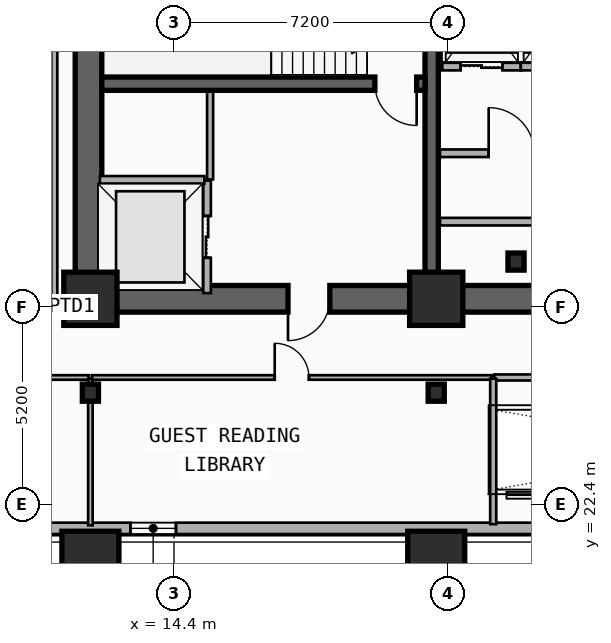
"""IFC4 building model, lengths in metres.
Left out: names, types, materials, properties, quantities, classifications, styles, units other than length and angle.
Written with IfcOpenShell. Run it as: python <this file> out.ifc"""

import sys

from ifc_helpers import new_model, si_unit, direction, frame, frame_2d, origin, origin_2d, place, context, subcontext, project, spatial, rectangle, i_section, extrude, element, fill, save


model = new_model("IFC4")
c1 = context("Model", 3, precision=1e-05, world=origin(), true_north=direction((0.0, 1.0)))
c2 = subcontext(c1, "Body", "Model", "MODEL_VIEW")
j1 = project(units=[si_unit("LENGTHUNIT", "METRE"), si_unit("PLANEANGLEUNIT", "RADIAN")], contexts=[c1])
p1 = place(None, origin())
s1 = spatial("IfcSite", under=j1, at=p1, CompositionType="ELEMENT")
p2 = place(p1, origin())
s2 = spatial("IfcBuilding", under=s1, at=p2, CompositionType="ELEMENT")
p3 = place(p2, frame((0.0, 0.0, 57.0)))
s3 = spatial("IfcBuildingStorey", under=s2, at=p3, CompositionType="ELEMENT", Elevation=57.0)
p4 = place(p3, frame((21.18, 27.82, 0.0), z_axis=(0.0, 0.0, 1.0), x_axis=(-1.0, 0.0, 0.0)))
e1 = element("IfcWall", 1, at=p4, inside=s3, PredefinedType="SHEAR", context=c2, shape_type="SweptSolid", body=[
    extrude(rectangle(XDim=9.03, YDim=0.7, at=frame_2d((4.515, 0.0))), origin(), (0.0, 0.0, 1.0), 3.5),
])
p5 = place(p4, frame((2.68, 0.0, 0.0)))
e2 = element("IfcOpeningElement", 2, at=p5, cuts=e1, PredefinedType="OPENING", context=c2, shape_type="SweptSolid", body=[
    extrude(rectangle(XDim=1.1, YDim=2.15, at=frame_2d((0.55, 1.075))), frame((0.0, 0.36, 0.0), z_axis=(0.0, -1.0, 0.0), x_axis=(1.0, 0.0, 0.0)), (0.0, 0.0, 1.0), 0.72),
])
p6 = place(p3, frame((33.15, 27.82, 0.0), z_axis=(0.0, 0.0, 1.0), x_axis=(-1.0, 0.0, 0.0)))
e3 = element("IfcWall", 3, at=p6, inside=s3, PredefinedType="SHEAR", context=c2, shape_type="SweptSolid", body=[
    extrude(rectangle(XDim=11.97, YDim=0.7, at=frame_2d((5.985, 0.0))), origin(), (0.0, 0.0, 1.0), 3.5),
])
p7 = place(p6, frame((6.1, 0.0, 0.0)))
e4 = element("IfcOpeningElement", 4, at=p7, cuts=e3, PredefinedType="OPENING", context=c2, shape_type="SweptSolid", body=[
    extrude(rectangle(XDim=1.6, YDim=2.2, at=frame_2d((0.8, 1.1))), frame((0.0, 0.36, 0.0), z_axis=(0.0, -1.0, 0.0), x_axis=(1.0, 0.0, 0.0)), (0.0, 0.0, 1.0), 0.72),
])
p8 = place(p3, frame((12.15, 28.17, 0.0), z_axis=(0.0, 0.0, 1.0), x_axis=(0.0, 1.0, 0.0)))
e5 = element("IfcWall", 5, at=p8, inside=s3, PredefinedType="SHEAR", context=c2, shape_type="SweptSolid", body=[
    extrude(rectangle(XDim=8.53, YDim=0.7, at=frame_2d((4.265, 0.0))), origin(), (0.0, 0.0, 1.0), 3.5),
])
p9 = place(p3, frame((21.18, 28.17, 0.0), z_axis=(0.0, 0.0, 1.0), x_axis=(0.0, 1.0, 0.0)))
e6 = element("IfcWall", 6, at=p9, inside=s3, PredefinedType="SHEAR", context=c2, shape_type="SweptSolid", body=[
    extrude(rectangle(XDim=8.53, YDim=0.35, at=frame_2d((4.265, 0.0))), origin(), (0.0, 0.0, 1.0), 3.5),
])
p10 = place(p3, frame((21.005, 33.48, 0.0), z_axis=(0.0, 0.0, 1.0), x_axis=(-1.0, 0.0, 0.0)))
e7 = element("IfcWall", 7, at=p10, inside=s3, PredefinedType="SHEAR", context=c2, shape_type="SweptSolid", body=[
    extrude(rectangle(XDim=8.505, YDim=0.35, at=frame_2d((4.252, 0.0))), origin(), (0.0, 0.0, 1.0), 3.5),
])
p11 = place(p10, frame((0.22, 0.0, 0.0)))
e8 = element("IfcOpeningElement", 8, at=p11, cuts=e7, PredefinedType="OPENING", context=c2, shape_type="SweptSolid", body=[
    extrude(rectangle(XDim=1.1, YDim=2.15, at=frame_2d((0.55, 1.075))), frame((0.0, 0.185, 0.0), z_axis=(0.0, -1.0, 0.0), x_axis=(1.0, 0.0, 0.0)), (0.0, 0.0, 1.0), 0.37),
])
p12 = place(p3, frame((23.4, 28.8, 0.0), z_axis=(0.0, 0.0, 1.0), x_axis=(1.0, 0.0, 0.0)))
e9 = element("IfcColumn", 9, at=p12, inside=s3, PredefinedType="COLUMN", context=c2, shape_type="SweptSolid", body=[
    extrude(i_section(OverallWidth=0.424, OverallDepth=0.45, WebThickness=0.041, FlangeThickness=0.065, FilletRadius=0.015, at=origin_2d()), origin(), (0.0, 0.0, 1.0), 3.5),
])
for number, where, z_axis, x_axis in (
    (10, (12.2, 27.82, 0.0), (0.0, 0.0, 1.0), (1.0, 0.0, 0.0)),
    (11, (21.3, 27.82, 0.0), (0.0, 0.0, 1.0), (1.0, 0.0, 0.0)),
):
    element("IfcColumn", number, at=place(p3, frame(where, z_axis=z_axis, x_axis=x_axis)), inside=s3, PredefinedType="COLUMN", context=c2, shape_type="SweptSolid", body=[
        extrude(rectangle(XDim=1.4, YDim=1.4, at=origin_2d()), origin(), (0.0, 0.0, 1.0), 3.5),
    ])
for number, where, z_axis, x_axis in (
    (12, (12.2, 25.35, 0.0), (0.0, 0.0, 1.0), (1.0, 0.0, 0.0)),
    (13, (21.3, 25.35, 0.0), (0.0, 0.0, 1.0), (1.0, 0.0, 0.0)),
):
    element("IfcColumn", number, at=place(p3, frame(where, z_axis=z_axis, x_axis=x_axis)), inside=s3, PredefinedType="COLUMN", context=c2, shape_type="SweptSolid", body=[
        extrude(i_section(OverallWidth=0.424, OverallDepth=0.45, WebThickness=0.041, FlangeThickness=0.065, FilletRadius=0.015, at=origin_2d()), origin(), (0.0, 0.0, 1.0), 3.5),
    ])
for number, where, z_axis, x_axis in (
    (14, (12.2, 21.062, 0.0), (0.0, -0.09, 0.996), (1.0, 0.0, 0.0)),
    (15, (21.3, 21.062, 0.0), (0.0, -0.09, 0.996), (1.0, 0.0, 0.0)),
):
    element("IfcColumn", number, at=place(p3, frame(where, z_axis=z_axis, x_axis=x_axis)), inside=s3, PredefinedType="COLUMN", context=c2, shape_type="SweptSolid", body=[
        extrude(rectangle(XDim=1.5, YDim=1.5, at=origin_2d()), origin(), (0.0, 0.0, 1.0), 3.514),
    ])
p13 = place(p3, frame((53.4, 21.78, 0.0), z_axis=(0.0, 0.0, 1.0), x_axis=(-1.0, 0.0, 0.0)))
e16 = element("IfcWall", 16, at=p13, inside=s3, PredefinedType="SOLIDWALL", context=c2, shape_type="SweptSolid", body=[
    extrude(rectangle(XDim=49.2, YDim=0.3, at=frame_2d((24.6, 0.0))), origin(), (0.0, 0.0, 1.0), 2.72),
])
p14 = place(p13, frame((43.109, 0.0, 0.74)))
e17 = element("IfcOpeningElement", 17, at=p14, cuts=e16, PredefinedType="OPENING", context=c2, shape_type="SweptSolid", body=[
    extrude(rectangle(XDim=1.8, YDim=1.8, at=frame_2d((0.9, 0.9))), frame((0.0, 0.16, 0.0), z_axis=(0.0, -1.0, 0.0), x_axis=(1.0, 0.0, 0.0)), (0.0, 0.0, 1.0), 0.32),
])
p15 = place(p13, frame((38.948, 0.0, 0.48)))
e18 = element("IfcOpeningElement", 18, at=p15, cuts=e16, PredefinedType="OPENING", context=c2, shape_type="SweptSolid", body=[
    extrude(rectangle(XDim=1.2, YDim=1.5, at=frame_2d((0.6, 0.75))), frame((0.0, 0.16, 0.0), z_axis=(0.0, -1.0, 0.0), x_axis=(1.0, 0.0, 0.0)), (0.0, 0.0, 1.0), 0.32),
])
p16 = place(p13, frame((14.798, 0.0, 0.48)))
e19 = element("IfcOpeningElement", 19, at=p16, cuts=e16, PredefinedType="OPENING", context=c2, shape_type="SweptSolid", body=[
    extrude(rectangle(XDim=1.2, YDim=1.5, at=frame_2d((0.6, 0.75))), frame((0.0, 0.16, 0.0), z_axis=(0.0, -1.0, 0.0), x_axis=(1.0, 0.0, 0.0)), (0.0, 0.0, 1.0), 0.32),
])
p17 = place(p13, frame((4.291, 0.0, 0.74)))
e20 = element("IfcOpeningElement", 20, at=p17, cuts=e16, PredefinedType="OPENING", context=c2, shape_type="SweptSolid", body=[
    extrude(rectangle(XDim=1.8, YDim=1.8, at=frame_2d((0.9, 0.9))), frame((0.0, 0.16, 0.0), z_axis=(0.0, -1.0, 0.0), x_axis=(1.0, 0.0, 0.0)), (0.0, 0.0, 1.0), 0.32),
])
p18 = place(p3, frame((15.27, 27.97, 0.0), z_axis=(0.0, 0.0, 1.0), x_axis=(0.0, 1.0, 0.0)))
e21 = element("IfcWall", 21, at=p18, inside=s3, PredefinedType="PARTITIONING", context=c2, shape_type="SweptSolid", body=[
    extrude(rectangle(XDim=2.96, YDim=0.2, at=frame_2d((1.48, 0.0))), origin(), (0.0, 0.0, 1.0), 2.212),
])
p19 = place(p18, frame((0.93, 0.0, 0.0)))
e22 = element("IfcOpeningElement", 22, at=p19, cuts=e21, PredefinedType="OPENING", context=c2, shape_type="SweptSolid", body=[
    extrude(rectangle(XDim=1.1, YDim=2.15, at=frame_2d((0.55, 1.075))), frame((0.0, 0.11, 0.0), z_axis=(0.0, -1.0, 0.0), x_axis=(1.0, 0.0, 0.0)), (0.0, 0.0, 1.0), 0.22),
])
p20 = place(p3, frame((12.45, 30.95, 0.0), z_axis=(0.0, 0.0, 1.0), x_axis=(1.0, 0.0, 0.0)))
e23 = element("IfcWall", 23, at=p20, inside=s3, PredefinedType="PARTITIONING", context=c2, shape_type="SweptSolid", body=[
    extrude(rectangle(XDim=2.75, YDim=0.2, at=frame_2d((1.375, 0.0))), origin(), (0.0, 0.0, 1.0), 2.212),
])
p21 = place(p3, frame((21.46, 33.93, 0.0), z_axis=(0.0, 0.0, 1.0), x_axis=(1.0, 0.0, 0.0)))
e24 = element("IfcWall", 24, at=p21, inside=s3, PredefinedType="PARTITIONING", context=c2, shape_type="SweptSolid", body=[
    extrude(rectangle(XDim=2.065, YDim=0.2, at=frame_2d((1.032, 0.0))), origin(), (0.0, 0.0, 1.0), 2.212),
])
p22 = place(p21, frame((0.482, 0.0, 0.0)))
e25 = element("IfcOpeningElement", 25, at=p22, cuts=e24, PredefinedType="OPENING", context=c2, shape_type="SweptSolid", body=[
    extrude(rectangle(XDim=1.1, YDim=2.15, at=frame_2d((0.55, 1.075))), frame((0.0, 0.11, 0.0), z_axis=(0.0, -1.0, 0.0), x_axis=(1.0, 0.0, 0.0)), (0.0, 0.0, 1.0), 0.22),
])
p23 = place(p3, frame((23.525, 33.93, 0.0), z_axis=(0.0, 0.0, 1.0), x_axis=(1.0, 0.0, 0.0)))
e26 = element("IfcWall", 26, at=p23, inside=s3, PredefinedType="PARTITIONING", context=c2, shape_type="SweptSolid", body=[
    extrude(rectangle(XDim=2.05, YDim=0.2, at=frame_2d((1.025, 0.0))), origin(), (0.0, 0.0, 1.0), 3.24),
])
p24 = place(p23, frame((0.475, 0.0, 0.0)))
e27 = element("IfcOpeningElement", 27, at=p24, cuts=e26, PredefinedType="OPENING", context=c2, shape_type="SweptSolid", body=[
    extrude(rectangle(XDim=1.1, YDim=2.15, at=frame_2d((0.55, 1.075))), frame((0.0, 0.11, 0.0), z_axis=(0.0, -1.0, 0.0), x_axis=(1.0, 0.0, 0.0)), (0.0, 0.0, 1.0), 0.22),
])
p25 = place(p3, frame((21.4, 31.65, 0.0), z_axis=(0.0, 0.0, 1.0), x_axis=(1.0, 0.0, 0.0)))
e28 = element("IfcWall", 28, at=p25, inside=s3, PredefinedType="PARTITIONING", context=c2, shape_type="SweptSolid", body=[
    extrude(rectangle(XDim=3.76, YDim=0.2, at=frame_2d((1.88, 0.0))), origin(), (0.0, 0.0, 1.0), 2.28),
])
p26 = place(p25, frame((1.28, 0.0, 0.0)))
e29 = element("IfcOpeningElement", 29, at=p26, cuts=e28, PredefinedType="OPENING", context=c2, shape_type="SweptSolid", body=[
    extrude(rectangle(XDim=1.2, YDim=2.15, at=frame_2d((0.6, 1.075))), frame((0.0, 0.11, 0.0), z_axis=(0.0, -1.0, 0.0), x_axis=(1.0, 0.0, 0.0)), (0.0, 0.0, 1.0), 0.22),
])
p27 = place(p3, frame((21.4, 29.85, 0.0), z_axis=(0.0, 0.0, 1.0), x_axis=(1.0, 0.0, 0.0)))
e30 = element("IfcWall", 30, at=p27, inside=s3, PredefinedType="PARTITIONING", context=c2, shape_type="SweptSolid", body=[
    extrude(rectangle(XDim=3.76, YDim=0.2, at=frame_2d((1.88, 0.0))), origin(), (0.0, 0.0, 1.0), 2.28),
])
p28 = place(p3, frame((0.26, 25.75, 0.0), z_axis=(0.0, 0.0, 1.0), x_axis=(1.0, 0.0, 0.0)))
e31 = element("IfcWall", 31, at=p28, inside=s3, PredefinedType="PARTITIONING", context=c2, shape_type="SweptSolid", body=[
    extrude(rectangle(XDim=11.9, YDim=0.12, at=frame_2d((5.95, 0.0))), origin(), (0.0, 0.0, 1.0), 2.31),
])
p29 = place(p28, frame((5.5, 0.0, 0.0)))
e32 = element("IfcOpeningElement", 32, at=p29, cuts=e31, PredefinedType="OPENING", context=c2, shape_type="SweptSolid", body=[
    extrude(rectangle(XDim=0.9, YDim=2.1, at=frame_2d((0.45, 1.05))), frame((0.0, 0.07, 0.0), z_axis=(0.0, -1.0, 0.0), x_axis=(1.0, 0.0, 0.0)), (0.0, 0.0, 1.0), 0.14),
])
p30 = place(p3, frame((12.24, 25.75, 0.0), z_axis=(0.0, 0.0, 1.0), x_axis=(1.0, 0.0, 0.0)))
e33 = element("IfcWall", 33, at=p30, inside=s3, PredefinedType="PARTITIONING", context=c2, shape_type="SweptSolid", body=[
    extrude(rectangle(XDim=10.52, YDim=0.12, at=frame_2d((5.26, 0.0))), origin(), (0.0, 0.0, 1.0), 2.31),
])
p31 = place(p30, frame((4.81, 0.0, 0.0)))
e34 = element("IfcOpeningElement", 34, at=p31, cuts=e33, PredefinedType="OPENING", context=c2, shape_type="SweptSolid", body=[
    extrude(rectangle(XDim=0.9, YDim=2.1, at=frame_2d((0.45, 1.05))), frame((0.0, 0.07, 0.0), z_axis=(0.0, -1.0, 0.0), x_axis=(1.0, 0.0, 0.0)), (0.0, 0.0, 1.0), 0.14),
])
p32 = place(p3, frame((12.2, 21.86, 0.0), z_axis=(0.0, 0.0, 1.0), x_axis=(0.0, 1.0, 0.0)))
e35 = element("IfcWall", 35, at=p32, inside=s3, PredefinedType="PARTITIONING", context=c2, shape_type="SweptSolid", body=[
    extrude(rectangle(XDim=3.85, YDim=0.12, at=frame_2d((1.925, 0.0))), origin(), (0.0, 0.0, 1.0), 2.31),
])
p33 = place(p3, frame((15.35, 30.96, 0.0), z_axis=(0.0, 0.0, 1.0), x_axis=(0.0, 1.0, 0.0)))
e36 = element("IfcWall", 36, at=p33, inside=s3, PredefinedType="PARTITIONING", context=c2, shape_type="SweptSolid", body=[
    extrude(rectangle(XDim=2.31, YDim=0.16, at=frame_2d((1.155, 0.0))), origin(), (0.0, 0.0, 1.0), 3.24),
])
p34 = place(p3, frame((22.83, 25.75, 0.0), z_axis=(0.0, 0.0, 1.0), x_axis=(1.0, 0.0, 0.0)))
e37 = element("IfcWall", 37, at=p34, inside=s3, PredefinedType="PARTITIONING", context=c2, shape_type="SweptSolid", body=[
    extrude(rectangle(XDim=11.94, YDim=0.16, at=frame_2d((5.97, 0.0))), origin(), (0.0, 0.0, 1.0), 3.24),
])
p35 = place(p3, frame((11.28, 27.6, 0.0), z_axis=(0.0, 0.0, 1.0), x_axis=(1.0, 0.0, 0.0)))
e38 = element("IfcWall", 38, at=p35, inside=s3, PredefinedType="PARTITIONING", context=c2, shape_type="SweptSolid", body=[
    extrude(rectangle(XDim=0.84, YDim=0.16, at=frame_2d((0.42, 0.0))), origin(), (0.0, 0.0, 1.0), 2.28),
])
p36 = place(p3, frame((11.25, 27.63, 0.0), z_axis=(0.0, 0.0, 1.0), x_axis=(0.0, 1.0, 0.0)))
e39 = element("IfcWall", 39, at=p36, inside=s3, PredefinedType="PARTITIONING", context=c2, shape_type="SweptSolid", body=[
    extrude(rectangle(XDim=10.24, YDim=0.16, at=frame_2d((5.12, 0.0))), origin(), (0.0, 0.0, 1.0), 2.72),
])
p37 = place(p3, frame((22.8, 21.89, 0.0), z_axis=(0.0, 0.0, 1.0), x_axis=(0.0, 1.0, 0.0)))
e40 = element("IfcWall", 40, at=p37, inside=s3, PredefinedType="PARTITIONING", context=c2, shape_type="SweptSolid", body=[
    extrude(rectangle(XDim=3.83, YDim=0.16, at=frame_2d((1.915, 0.0))), origin(), (0.0, 0.0, 1.0), 2.68),
])
p38 = place(p15, origin())
e41 = element("IfcWindow", 41, at=p38, inside=s3, PartitioningType="SINGLE_PANEL", PredefinedType="WINDOW", context=c2, shape_type="SweptSolid", body=[
    extrude(rectangle(XDim=1.2, YDim=1.5, at=frame_2d((0.6, 0.75))), frame((0.0, 0.03, 0.0), z_axis=(0.0, -1.0, 0.0), x_axis=(1.0, 0.0, 0.0)), (0.0, 0.0, 1.0), 0.06),
])
fill(e18, e41)
p39 = place(p19, origin())
e42 = element("IfcDoor", 42, at=p39, inside=s3, OperationType="DOUBLE_DOOR_SLIDING", PredefinedType="DOOR", context=c2, shape_type="SweptSolid", body=[
    extrude(rectangle(XDim=1.1, YDim=2.15, at=frame_2d((0.55, 1.075))), frame((0.0, 0.025, 0.0), z_axis=(0.0, -1.0, 0.0), x_axis=(1.0, 0.0, 0.0)), (0.0, 0.0, 1.0), 0.05),
])
fill(e22, e42)
p40 = place(p22, origin())
e43 = element("IfcDoor", 43, at=p40, inside=s3, OperationType="DOUBLE_DOOR_SLIDING", PredefinedType="DOOR", context=c2, shape_type="SweptSolid", body=[
    extrude(rectangle(XDim=1.1, YDim=2.15, at=frame_2d((0.55, 1.075))), frame((0.0, 0.025, 0.0), z_axis=(0.0, -1.0, 0.0), x_axis=(1.0, 0.0, 0.0)), (0.0, 0.0, 1.0), 0.05),
])
fill(e25, e43)
p41 = place(p11, origin())
e44 = element("IfcDoor", 44, at=p41, inside=s3, OperationType="SINGLE_SWING_LEFT", PredefinedType="DOOR", context=c2, shape_type="SweptSolid", body=[
    extrude(rectangle(XDim=1.1, YDim=2.15, at=frame_2d((0.55, 1.075))), frame((0.0, 0.025, 0.0), z_axis=(0.0, -1.0, 0.0), x_axis=(1.0, 0.0, 0.0)), (0.0, 0.0, 1.0), 0.05),
])
fill(e8, e44)
p42 = place(p5, origin())
e45 = element("IfcDoor", 45, at=p42, inside=s3, OperationType="SINGLE_SWING_RIGHT", PredefinedType="DOOR", context=c2, shape_type="SweptSolid", body=[
    extrude(rectangle(XDim=1.1, YDim=2.15, at=frame_2d((0.55, 1.075))), frame((0.0, 0.025, 0.0), z_axis=(0.0, -1.0, 0.0), x_axis=(1.0, 0.0, 0.0)), (0.0, 0.0, 1.0), 0.05),
])
fill(e2, e45)
p43 = place(p26, origin())
e46 = element("IfcDoor", 46, at=p43, inside=s3, OperationType="SINGLE_SWING_LEFT", PredefinedType="DOOR", context=c2, shape_type="SweptSolid", body=[
    extrude(rectangle(XDim=1.2, YDim=2.15, at=frame_2d((0.6, 1.075))), frame((0.0, 0.025, 0.0), z_axis=(0.0, -1.0, 0.0), x_axis=(1.0, 0.0, 0.0)), (0.0, 0.0, 1.0), 0.05),
])
fill(e29, e46)
p44 = place(p31, origin())
e47 = element("IfcDoor", 47, at=p44, inside=s3, OperationType="SINGLE_SWING_LEFT", PredefinedType="DOOR", context=c2, shape_type="SweptSolid", body=[
    extrude(rectangle(XDim=0.9, YDim=2.1, at=frame_2d((0.45, 1.05))), frame((0.0, 0.025, 0.0), z_axis=(0.0, -1.0, 0.0), x_axis=(1.0, 0.0, 0.0)), (0.0, 0.0, 1.0), 0.05),
])
fill(e34, e47)
save(model, sys.argv[1])
